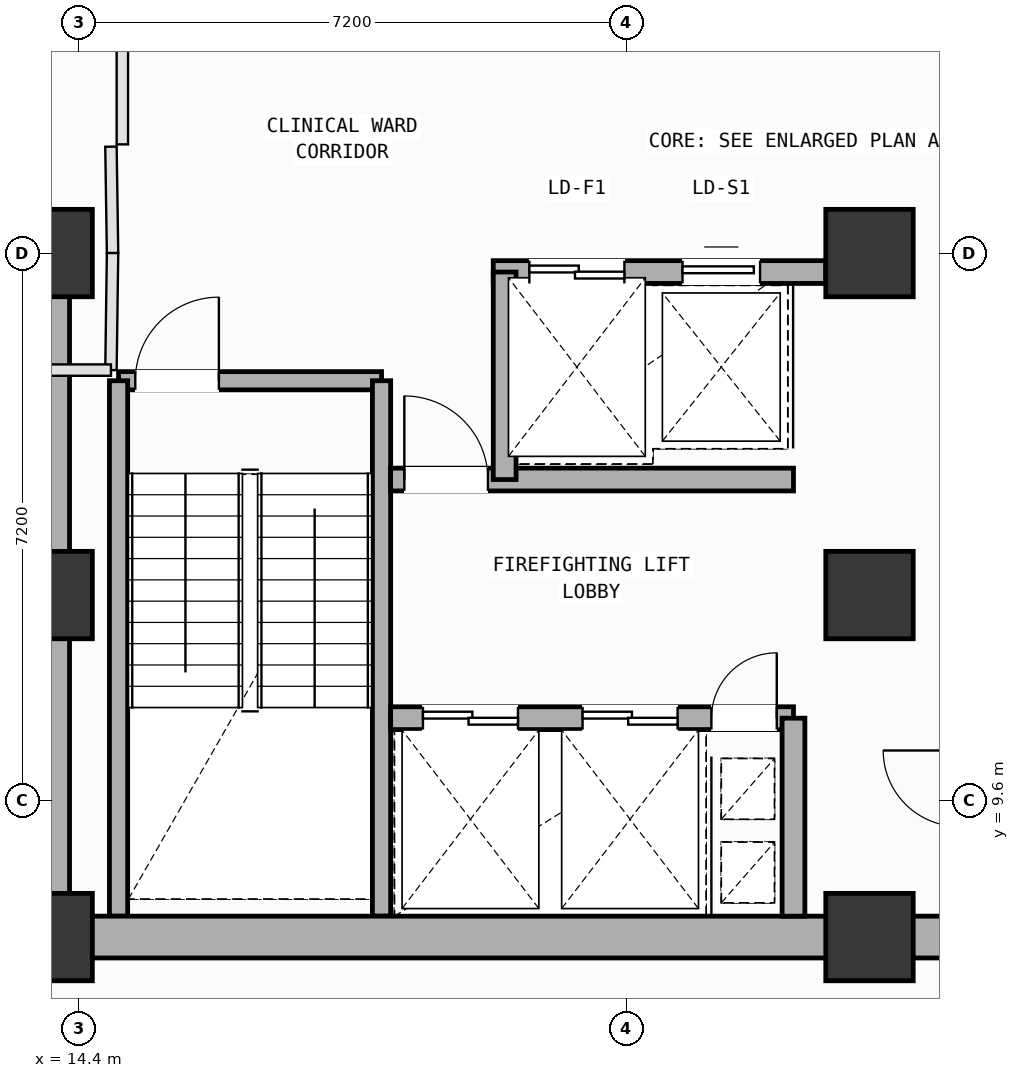
"""IFC4 building model, lengths in metres.
Left out: names, types, materials, properties, quantities, classifications, styles, units other than length and angle.
Written with IfcOpenShell. Run it as: python <this file> out.ifc"""

import sys

from ifc_helpers import new_model, si_unit, direction, frame, frame_2d, origin, origin_2d, place, context, subcontext, project, spatial, rectangle, extrude, element, fill, save


model = new_model("IFC4")
c1 = context("Model", 3, precision=1e-05, world=origin(), true_north=direction((0.0, 1.0)))
c2 = subcontext(c1, "Body", "Model", "MODEL_VIEW")
j1 = project(units=[si_unit("LENGTHUNIT", "METRE"), si_unit("PLANEANGLEUNIT", "RADIAN")], contexts=[c1])
p1 = place(None, origin())
s1 = spatial("IfcSite", under=j1, at=p1, CompositionType="ELEMENT")
p2 = place(p1, origin())
s2 = spatial("IfcBuilding", under=s1, at=p2, CompositionType="ELEMENT")
p3 = place(p2, frame((0.0, 0.0, 197.8)))
s3 = spatial("IfcBuildingStorey", under=s2, at=p3, CompositionType="ELEMENT", Elevation=197.8)
for number, where, z_axis, x_axis in (
    (1, (14.0, 7.8, 0.0), (0.0, 0.0, 1.0), (1.0, 0.0, 0.0)),
    (2, (14.0, 12.3, 0.0), (0.0, 0.0, 1.0), (1.0, 0.0, 0.0)),
    (3, (14.0, 16.8, 0.0), (0.0, 0.0, 1.0), (1.0, 0.0, 0.0)),
    (4, (24.8, 7.8, 0.0), (0.0, 0.0, 1.0), (1.0, 0.0, 0.0)),
    (5, (24.8, 12.3, 0.0), (0.0, 0.0, 1.0), (1.0, 0.0, 0.0)),
    (6, (24.8, 16.8, 0.0), (0.0, 0.0, 1.0), (1.0, 0.0, 0.0)),
):
    element("IfcColumn", number, at=place(p3, frame(where, z_axis=z_axis, x_axis=x_axis)), inside=s3, PredefinedType="COLUMN", context=c2, shape_type="SweptSolid", body=[
        extrude(rectangle(XDim=1.15, YDim=1.15, at=origin_2d()), origin(), (0.0, 0.0, 1.0), 4.0),
    ])
p4 = place(p3, frame((16.848, 2.206, 0.0), z_axis=(0.0, 0.0, 1.0), x_axis=(-0.654052430164, 0.756449217461, 0.0)))
e7 = element("IfcWall", 7, at=p4, inside=s3, PredefinedType="SOLIDWALL", context=c2, shape_type="SweptSolid", body=[
    extrude(rectangle(XDim=7.36, YDim=0.28, at=frame_2d((3.68, 0.0))), origin(), (0.0, 0.0, 1.0), 3.265),
])
p5 = place(p4, frame((3.081, 0.0, 0.75)))
e8 = element("IfcOpeningElement", 8, at=p5, cuts=e7, PredefinedType="OPENING", context=c2, shape_type="SweptSolid", body=[
    extrude(rectangle(XDim=1.2, YDim=1.75, at=frame_2d((0.6, 0.875))), frame((0.0, 0.15, 0.0), z_axis=(0.0, -1.0, 0.0), x_axis=(1.0, 0.0, 0.0)), (0.0, 0.0, 1.0), 0.3),
])
p6 = place(p4, frame((0.876, 0.0, 0.75)))
e9 = element("IfcOpeningElement", 9, at=p6, cuts=e7, PredefinedType="OPENING", context=c2, shape_type="SweptSolid", body=[
    extrude(rectangle(XDim=1.2, YDim=1.75, at=frame_2d((0.6, 0.875))), frame((0.0, 0.15, 0.0), z_axis=(0.0, -1.0, 0.0), x_axis=(1.0, 0.0, 0.0)), (0.0, 0.0, 1.0), 0.3),
])
p7 = place(p3, frame((14.92, 15.12, 0.0), z_axis=(0.0, 0.0, 1.0), x_axis=(1.0, 0.0, 0.0)))
e10 = element("IfcWall", 10, at=p7, inside=s3, PredefinedType="SOLIDWALL", context=c2, shape_type="SweptSolid", body=[
    extrude(rectangle(XDim=3.46, YDim=0.24, at=frame_2d((1.73, 0.0))), origin(), (0.0, 0.0, 1.0), 3.78),
])
p8 = place(p7, frame((0.22, 0.0, 0.0)))
e11 = element("IfcOpeningElement", 11, at=p8, cuts=e10, PredefinedType="OPENING", context=c2, shape_type="SweptSolid", body=[
    extrude(rectangle(XDim=1.1, YDim=2.15, at=frame_2d((0.55, 1.075))), frame((0.0, 0.13, 0.0), z_axis=(0.0, -1.0, 0.0), x_axis=(1.0, 0.0, 0.0)), (0.0, 0.0, 1.0), 0.26),
])
for number, where, z_axis, x_axis in (
    (12, (18.38, 15.12, 0.0), (0.0, 0.0, 1.0), (0.0, -1.0, 0.0)),
    (13, (14.92, 8.075, 0.0), (0.0, 0.0, 1.0), (0.0, 1.0, 0.0)),
):
    element("IfcWall", number, at=place(p3, frame(where, z_axis=z_axis, x_axis=x_axis)), inside=s3, PredefinedType="SOLIDWALL", context=c2, shape_type="SweptSolid", body=[
        extrude(rectangle(XDim=7.045, YDim=0.24, at=frame_2d((3.522, 0.0))), origin(), (0.0, 0.0, 1.0), 3.78),
    ])
for number, where, z_axis, x_axis in (
    (14, (14.0, 7.8, 0.0), (0.0, 0.0, 1.0), (1.0, 0.0, 0.0)),
    (15, (24.8, 7.8, 0.0), (0.0, 0.0, 1.0), (1.0, 0.0, 0.0)),
):
    element("IfcWall", number, at=place(p3, frame(where, z_axis=z_axis, x_axis=x_axis)), inside=s3, PredefinedType="SHEAR", context=c2, shape_type="SweptSolid", body=[
        extrude(rectangle(XDim=10.8, YDim=0.55, at=frame_2d((5.4, 0.0))), origin(), (0.0, 0.0, 1.0), 3.78),
    ])
p9 = place(p3, frame((14.0, 16.8, 0.0), z_axis=(0.0, 0.0, 1.0), x_axis=(0.0, -1.0, 0.0)))
e16 = element("IfcWall", 16, at=p9, inside=s3, PredefinedType="SHEAR", context=c2, shape_type="SweptSolid", body=[
    extrude(rectangle(XDim=9.0, YDim=0.55, at=frame_2d((4.5, 0.0))), origin(), (0.0, 0.0, 1.0), 3.78),
])
p10 = place(p3, frame((19.85, 16.55, 0.0), z_axis=(0.0, 0.0, 1.0), x_axis=(1.0, 0.0, 0.0)))
e17 = element("IfcWall", 17, at=p10, inside=s3, PredefinedType="SOLIDWALL", context=c2, shape_type="SweptSolid", body=[
    extrude(rectangle(XDim=4.375, YDim=0.3, at=frame_2d((2.188, 0.0))), origin(), (0.0, 0.0, 1.0), 3.78),
])
p11 = place(p10, frame((0.475, 0.0, 0.0)))
e18 = element("IfcOpeningElement", 18, at=p11, cuts=e17, PredefinedType="OPENING", context=c2, shape_type="SweptSolid", body=[
    extrude(rectangle(XDim=1.25, YDim=2.18, at=frame_2d((0.625, 1.09))), frame((0.0, 0.16, 0.0), z_axis=(0.0, -1.0, 0.0), x_axis=(1.0, 0.0, 0.0)), (0.0, 0.0, 1.0), 0.32),
])
p12 = place(p10, frame((2.49, 0.0, 0.0)))
e19 = element("IfcOpeningElement", 19, at=p12, cuts=e17, PredefinedType="OPENING", context=c2, shape_type="SweptSolid", body=[
    extrude(rectangle(XDim=1.02, YDim=2.12, at=frame_2d((0.51, 1.06))), frame((0.0, 0.16, 0.0), z_axis=(0.0, -1.0, 0.0), x_axis=(1.0, 0.0, 0.0)), (0.0, 0.0, 1.0), 0.32),
])
p13 = place(p3, frame((18.5, 10.68, 0.0), z_axis=(0.0, 0.0, 1.0), x_axis=(1.0, 0.0, 0.0)))
e20 = element("IfcWall", 20, at=p13, inside=s3, PredefinedType="SOLIDWALL", context=c2, shape_type="SweptSolid", body=[
    extrude(rectangle(XDim=5.3, YDim=0.3, at=frame_2d((2.65, 0.0))), origin(), (0.0, 0.0, 1.0), 3.78),
])
p14 = place(p13, frame((4.22, 0.0, 0.0)))
e21 = element("IfcOpeningElement", 21, at=p14, cuts=e20, PredefinedType="OPENING", context=c2, shape_type="SweptSolid", body=[
    extrude(rectangle(XDim=0.86, YDim=2.06, at=frame_2d((0.43, 1.03))), frame((0.0, 0.16, 0.0), z_axis=(0.0, -1.0, 0.0), x_axis=(1.0, 0.0, 0.0)), (0.0, 0.0, 1.0), 0.32),
])
p15 = place(p13, frame((0.425, 0.0, 0.0)))
e22 = element("IfcOpeningElement", 22, at=p15, cuts=e20, PredefinedType="OPENING", context=c2, shape_type="SweptSolid", body=[
    extrude(rectangle(XDim=1.25, YDim=2.18, at=frame_2d((0.625, 1.09))), frame((0.0, 0.16, 0.0), z_axis=(0.0, -1.0, 0.0), x_axis=(1.0, 0.0, 0.0)), (0.0, 0.0, 1.0), 0.32),
])
p16 = place(p13, frame((2.525, 0.0, 0.0)))
e23 = element("IfcOpeningElement", 23, at=p16, cuts=e20, PredefinedType="OPENING", context=c2, shape_type="SweptSolid", body=[
    extrude(rectangle(XDim=1.25, YDim=2.18, at=frame_2d((0.625, 1.09))), frame((0.0, 0.16, 0.0), z_axis=(0.0, -1.0, 0.0), x_axis=(1.0, 0.0, 0.0)), (0.0, 0.0, 1.0), 0.32),
])
p17 = place(p3, frame((18.5, 13.82, 0.0), z_axis=(0.0, 0.0, 1.0), x_axis=(1.0, 0.0, 0.0)))
e24 = element("IfcWall", 24, at=p17, inside=s3, PredefinedType="SOLIDWALL", context=c2, shape_type="SweptSolid", body=[
    extrude(rectangle(XDim=5.3, YDim=0.3, at=frame_2d((2.65, 0.0))), origin(), (0.0, 0.0, 1.0), 3.78),
])
p18 = place(p17, frame((0.18, 0.0, 0.0)))
e25 = element("IfcOpeningElement", 25, at=p18, cuts=e24, PredefinedType="OPENING", context=c2, shape_type="SweptSolid", body=[
    extrude(rectangle(XDim=1.1, YDim=2.15, at=frame_2d((0.55, 1.075))), frame((0.0, 0.16, 0.0), z_axis=(0.0, -1.0, 0.0), x_axis=(1.0, 0.0, 0.0)), (0.0, 0.0, 1.0), 0.32),
])
p19 = place(p3, frame((23.8, 8.075, 0.0), z_axis=(0.0, 0.0, 1.0), x_axis=(0.0, 1.0, 0.0)))
e26 = element("IfcWall", 26, at=p19, inside=s3, PredefinedType="SOLIDWALL", context=c2, shape_type="SweptSolid", body=[
    extrude(rectangle(XDim=2.605, YDim=0.3, at=frame_2d((1.302, 0.0))), origin(), (0.0, 0.0, 1.0), 3.78),
])
p20 = place(p3, frame((20.0, 13.82, 0.0), z_axis=(0.0, 0.0, 1.0), x_axis=(0.0, 1.0, 0.0)))
e27 = element("IfcWall", 27, at=p20, inside=s3, PredefinedType="SOLIDWALL", context=c2, shape_type="SweptSolid", body=[
    extrude(rectangle(XDim=2.73, YDim=0.3, at=frame_2d((1.365, 0.0))), origin(), (0.0, 0.0, 1.0), 3.78),
])
p21 = place(p3, frame((19.602, -0.788, 0.0), z_axis=(0.0, 0.0, 1.0), x_axis=(0.756432248101, 0.654072055688, 0.0)))
e28 = element("IfcWall", 28, at=p21, inside=s3, PredefinedType="PARTITIONING", context=c2, shape_type="SweptSolid", body=[
    extrude(rectangle(XDim=12.24, YDim=0.15, at=frame_2d((6.12, 0.0))), origin(), (0.0, 0.0, 1.0), 3.78),
])
p22 = place(p3, frame((28.992, 7.675, 0.0), z_axis=(0.0, 0.0, 1.0), x_axis=(-0.756407052187, -0.654101193549, 0.0)))
e29 = element("IfcWall", 29, at=p22, inside=s3, PredefinedType="PARTITIONING", context=c2, shape_type="SweptSolid", body=[
    extrude(rectangle(XDim=12.648, YDim=0.15, at=frame_2d((6.324, 0.0))), origin(), (0.0, 0.0, 1.0), 3.78),
])
p23 = place(p3, frame((14.97, 20.55, 0.0), z_axis=(0.0, 0.0, 1.0), x_axis=(0.0, -1.0, 0.0)))
e30 = element("IfcWall", 30, at=p23, inside=s3, PredefinedType="PARTITIONING", context=c2, shape_type="SweptSolid", body=[
    extrude(rectangle(XDim=2.32, YDim=0.15, at=frame_2d((1.16, 0.0))), origin(), (0.0, 0.0, 1.0), 3.78),
])
p24 = place(p3, frame((14.82, 18.2, 0.0), z_axis=(0.0, 0.0, 1.0), x_axis=(0.01499656939, -0.99988754513, 0.0)))
e31 = element("IfcWall", 31, at=p24, inside=s3, PredefinedType="PARTITIONING", context=c2, shape_type="SweptSolid", body=[
    extrude(rectangle(XDim=1.4, YDim=0.15, at=frame_2d((0.7, 0.0))), origin(), (0.0, 0.0, 1.0), 3.78),
])
p25 = place(p3, frame((14.841, 16.8, 0.0), z_axis=(0.0, 0.0, 1.0), x_axis=(-0.01363221443, -0.999907077048, 0.0)))
e32 = element("IfcWall", 32, at=p25, inside=s3, PredefinedType="PARTITIONING", context=c2, shape_type="SweptSolid", body=[
    extrude(rectangle(XDim=1.54, YDim=0.15, at=frame_2d((0.77, 0.0))), origin(), (0.0, 0.0, 1.0), 3.78),
])
p26 = place(p3, frame((14.82, 15.26, 0.0), z_axis=(0.0, 0.0, 1.0), x_axis=(-1.0, 0.0, 0.0)))
e33 = element("IfcWall", 33, at=p26, inside=s3, PredefinedType="PARTITIONING", context=c2, shape_type="SweptSolid", body=[
    extrude(rectangle(XDim=1.12, YDim=0.15, at=frame_2d((0.56, 0.0))), origin(), (0.0, 0.0, 1.0), 3.78),
])
p27 = place(p8, origin())
e34 = element("IfcDoor", 34, at=p27, inside=s3, OperationType="SINGLE_SWING_RIGHT", PredefinedType="DOOR", context=c2, shape_type="SweptSolid", body=[
    extrude(rectangle(XDim=1.1, YDim=2.15, at=frame_2d((0.55, 1.075))), frame((0.0, 0.025, 0.0), z_axis=(0.0, -1.0, 0.0), x_axis=(1.0, 0.0, 0.0)), (0.0, 0.0, 1.0), 0.05),
])
fill(e11, e34)
p28 = place(p14, origin())
e35 = element("IfcDoor", 35, at=p28, inside=s3, OperationType="SINGLE_SWING_RIGHT", PredefinedType="DOOR", context=c2, shape_type="SweptSolid", body=[
    extrude(rectangle(XDim=0.86, YDim=2.06, at=frame_2d((0.43, 1.03))), frame((0.0, 0.025, 0.0), z_axis=(0.0, -1.0, 0.0), x_axis=(1.0, 0.0, 0.0)), (0.0, 0.0, 1.0), 0.05),
])
fill(e21, e35)
p29 = place(p18, origin())
e36 = element("IfcDoor", 36, at=p29, inside=s3, OperationType="SINGLE_SWING_LEFT", PredefinedType="DOOR", context=c2, shape_type="SweptSolid", body=[
    extrude(rectangle(XDim=1.1, YDim=2.15, at=frame_2d((0.55, 1.075))), frame((0.0, 0.025, 0.0), z_axis=(0.0, -1.0, 0.0), x_axis=(1.0, 0.0, 0.0)), (0.0, 0.0, 1.0), 0.05),
])
fill(e25, e36)
p30 = place(p15, origin())
e37 = element("IfcDoor", 37, at=p30, inside=s3, OperationType="DOUBLE_DOOR_SLIDING", PredefinedType="DOOR", context=c2, shape_type="SweptSolid", body=[
    extrude(rectangle(XDim=1.25, YDim=2.18, at=frame_2d((0.625, 1.09))), frame((0.0, 0.025, 0.0), z_axis=(0.0, -1.0, 0.0), x_axis=(1.0, 0.0, 0.0)), (0.0, 0.0, 1.0), 0.05),
])
fill(e22, e37)
p31 = place(p16, origin())
e38 = element("IfcDoor", 38, at=p31, inside=s3, OperationType="DOUBLE_DOOR_SLIDING", PredefinedType="DOOR", context=c2, shape_type="SweptSolid", body=[
    extrude(rectangle(XDim=1.25, YDim=2.18, at=frame_2d((0.625, 1.09))), frame((0.0, 0.025, 0.0), z_axis=(0.0, -1.0, 0.0), x_axis=(1.0, 0.0, 0.0)), (0.0, 0.0, 1.0), 0.05),
])
fill(e23, e38)
p32 = place(p11, origin())
e39 = element("IfcDoor", 39, at=p32, inside=s3, OperationType="DOUBLE_DOOR_SLIDING", PredefinedType="DOOR", context=c2, shape_type="SweptSolid", body=[
    extrude(rectangle(XDim=1.25, YDim=2.18, at=frame_2d((0.625, 1.09))), frame((0.0, 0.025, 0.0), z_axis=(0.0, -1.0, 0.0), x_axis=(1.0, 0.0, 0.0)), (0.0, 0.0, 1.0), 0.05),
])
fill(e18, e39)
p33 = place(p12, origin())
e40 = element("IfcDoor", 40, at=p33, inside=s3, OperationType="SLIDING_TO_LEFT", PredefinedType="DOOR", context=c2, shape_type="SweptSolid", body=[
    extrude(rectangle(XDim=1.02, YDim=2.12, at=frame_2d((0.51, 1.06))), frame((0.0, 0.025, 0.0), z_axis=(0.0, -1.0, 0.0), x_axis=(1.0, 0.0, 0.0)), (0.0, 0.0, 1.0), 0.05),
])
fill(e19, e40)
save(model, sys.argv[1])
